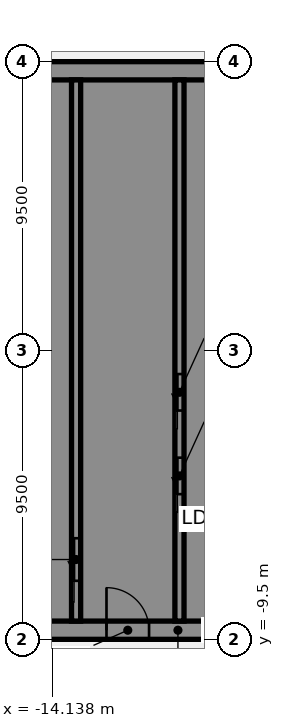
"""IFC4 building model, lengths in metres.
Left out: names, types, materials, properties, quantities, classifications, styles, units other than length and angle.
Written with IfcOpenShell. Run it as: python <this file> out.ifc"""

import sys

from ifc_helpers import new_model, si_unit, direction, frame, frame_2d, origin, place, context, subcontext, project, spatial, polyline, rectangle, outline, extrude, element, fill, save


model = new_model("IFC4")
c1 = context("Model", 3, precision=1e-05, world=origin(), true_north=direction((0.0, 1.0)))
c2 = subcontext(c1, "Body", "Model", "MODEL_VIEW")
j1 = project(units=[si_unit("LENGTHUNIT", "METRE"), si_unit("PLANEANGLEUNIT", "RADIAN")], contexts=[c1])
p1 = place(None, origin())
s1 = spatial("IfcSite", under=j1, at=p1, CompositionType="ELEMENT")
p2 = place(p1, origin())
s2 = spatial("IfcBuilding", under=s1, at=p2, CompositionType="ELEMENT")
p3 = place(p2, frame((0.0, 0.0, 133.0)))
s3 = spatial("IfcBuildingStorey", under=s2, at=p3, CompositionType="ELEMENT", Elevation=133.0)
p4 = place(p3, frame((-16.5, -9.2, 0.0), z_axis=(0.0, 0.0, 1.0), x_axis=(1.0, 0.0, 0.0)))
e1 = element("IfcWall", 1, at=p4, inside=s3, PredefinedType="SHEAR", context=c2, shape_type="SweptSolid", body=[
    extrude(rectangle(XDim=13.0, YDim=0.6, at=frame_2d((6.5, 0.0))), origin(), (0.0, 0.0, 1.0), 3.61),
])
p5 = place(p4, frame((4.15, 0.0, 0.0)))
e2 = element("IfcOpeningElement", 2, at=p5, cuts=e1, PredefinedType="OPENING", context=c2, shape_type="SweptSolid", body=[
    extrude(rectangle(XDim=1.4, YDim=2.1, at=frame_2d((0.7, 1.05))), frame((0.0, 0.31, 0.0), z_axis=(0.0, -1.0, 0.0), x_axis=(1.0, 0.0, 0.0)), (0.0, 0.0, 1.0), 0.62),
])
p6 = place(p4, frame((10.125, 0.0, 0.0)))
e3 = element("IfcOpeningElement", 3, at=p6, cuts=e1, PredefinedType="OPENING", context=c2, shape_type="SweptSolid", body=[
    extrude(rectangle(XDim=1.4, YDim=2.1, at=frame_2d((0.7, 1.05))), frame((0.0, 0.31, 0.0), z_axis=(0.0, -1.0, 0.0), x_axis=(1.0, 0.0, 0.0)), (0.0, 0.0, 1.0), 0.62),
])
p7 = place(p3, origin())
e4 = element("IfcWall", 4, at=p7, inside=s3, PredefinedType="SHEAR", context=c2, shape_type="SweptSolid", body=[
    extrude(outline(polyline([(-13.5, -8.9), (-13.5, -8.125), (-15.9, -8.125), (-15.9, -5.625), (-13.5, -5.625), (-13.5, -5.375), (-15.9, -5.375), (-15.9, -2.875), (-13.5, -2.875), (-13.5, -2.625), (-15.9, -2.625), (-15.9, -0.125), (-13.5, -0.125), (-13.5, 0.125), (-15.9, 0.125), (-15.9, 2.625), (-13.5, 2.625), (-13.5, 2.875), (-15.9, 2.875), (-15.9, 5.375), (-13.5, 5.375), (-13.5, 5.625), (-15.9, 5.625), (-15.9, 8.125), (-13.5, 8.125), (-13.5, 8.9), (-15.9, 8.9), (-16.5, 8.9), (-16.5, -8.9), (-15.9, -8.9), (-13.5, -8.9)])), origin(), (0.0, 0.0, 1.0), 3.61),
])
p8 = place(p3, frame((-16.5, 9.2, 0.0), z_axis=(0.0, 0.0, 1.0), x_axis=(1.0, 0.0, 0.0)))
e5 = element("IfcWall", 5, at=p8, inside=s3, PredefinedType="SHEAR", context=c2, shape_type="SweptSolid", body=[
    extrude(rectangle(XDim=13.0, YDim=0.6, at=frame_2d((6.5, 0.0))), origin(), (0.0, 0.0, 1.0), 3.61),
])
p9 = place(p3, origin())
e6 = element("IfcWall", 6, at=p9, inside=s3, PredefinedType="SHEAR", context=c2, shape_type="SweptSolid", body=[
    extrude(outline(polyline([(-9.8, -5.375), (-9.8, -5.625), (-7.5, -5.625), (-7.2, -5.625), (-7.2, 8.9), (-7.5, 8.9), (-9.8, 8.9), (-9.8, 8.125), (-7.5, 8.125), (-7.5, 5.625), (-9.8, 5.625), (-9.8, 5.375), (-7.5, 5.375), (-7.5, 2.875), (-9.8, 2.875), (-9.8, 2.625), (-7.5, 2.625), (-7.5, 0.125), (-9.8, 0.125), (-9.8, -0.125), (-7.5, -0.125), (-7.5, -2.625), (-9.8, -2.625), (-9.8, -2.875), (-7.5, -2.875), (-7.5, -5.375), (-9.8, -5.375)])), origin(), (0.0, 0.0, 1.0), 3.61),
])
p10 = place(p3, origin())
e7 = element("IfcWall", 7, at=p10, inside=s3, PredefinedType="SHEAR", context=c2, shape_type="SweptSolid", body=[
    extrude(outline(polyline([(-7.5, -8.125), (-9.55, -8.125), (-9.55, -5.625), (-9.8, -5.625), (-9.8, -8.125), (-9.8, -8.9), (-7.5, -8.9), (-7.5, -8.125)])), origin(), (0.0, 0.0, 1.0), 3.61),
])
p11 = place(p3, frame((-13.35, -8.9, 0.0), z_axis=(0.0, 0.0, 1.0), x_axis=(0.0, 1.0, 0.0)))
e8 = element("IfcWall", 8, at=p11, inside=s3, PredefinedType="SHEAR", context=c2, shape_type="SweptSolid", body=[
    extrude(rectangle(XDim=17.8, YDim=0.3, at=frame_2d((8.9, 0.0))), origin(), (0.0, 0.0, 1.0), 3.61),
])
p12 = place(p11, frame((1.325, 0.0, 0.0)))
e9 = element("IfcOpeningElement", 9, at=p12, cuts=e8, PredefinedType="OPENING", context=c2, shape_type="SweptSolid", body=[
    extrude(rectangle(XDim=1.4, YDim=2.1, at=frame_2d((0.7, 1.05))), frame((0.0, 0.16, 0.0), z_axis=(0.0, -1.0, 0.0), x_axis=(1.0, 0.0, 0.0)), (0.0, 0.0, 1.0), 0.32),
])
p13 = place(p3, frame((-9.95, -8.9, 0.0), z_axis=(0.0, 0.0, 1.0), x_axis=(0.0, 1.0, 0.0)))
e10 = element("IfcWall", 10, at=p13, inside=s3, PredefinedType="SHEAR", context=c2, shape_type="SweptSolid", body=[
    extrude(rectangle(XDim=17.8, YDim=0.3, at=frame_2d((8.9, 0.0))), origin(), (0.0, 0.0, 1.0), 3.61),
])
p14 = place(p13, frame((4.175, 0.0, 0.0)))
e11 = element("IfcOpeningElement", 11, at=p14, cuts=e10, PredefinedType="OPENING", context=c2, shape_type="SweptSolid", body=[
    extrude(rectangle(XDim=1.2, YDim=2.1, at=frame_2d((0.6, 1.05))), frame((0.0, 0.16, 0.0), z_axis=(0.0, -1.0, 0.0), x_axis=(1.0, 0.0, 0.0)), (0.0, 0.0, 1.0), 0.32),
])
p15 = place(p13, frame((6.925, 0.0, 0.0)))
e12 = element("IfcOpeningElement", 12, at=p15, cuts=e10, PredefinedType="OPENING", context=c2, shape_type="SweptSolid", body=[
    extrude(rectangle(XDim=1.2, YDim=2.1, at=frame_2d((0.6, 1.05))), frame((0.0, 0.16, 0.0), z_axis=(0.0, -1.0, 0.0), x_axis=(1.0, 0.0, 0.0)), (0.0, 0.0, 1.0), 0.32),
])
p16 = place(p5, origin())
e13 = element("IfcDoor", 13, at=p16, inside=s3, OperationType="SINGLE_SWING_LEFT", PredefinedType="DOOR", context=c2, shape_type="SweptSolid", body=[
    extrude(rectangle(XDim=1.4, YDim=2.1, at=frame_2d((0.7, 1.05))), frame((0.0, 0.025, 0.0), z_axis=(0.0, -1.0, 0.0), x_axis=(1.0, 0.0, 0.0)), (0.0, 0.0, 1.0), 0.05),
])
fill(e2, e13)
p17 = place(p12, origin())
e14 = element("IfcDoor", 14, at=p17, inside=s3, OperationType="SLIDING_TO_LEFT", PredefinedType="DOOR", context=c2, shape_type="SweptSolid", body=[
    extrude(rectangle(XDim=1.4, YDim=2.1, at=frame_2d((0.7, 1.05))), frame((0.0, 0.025, 0.0), z_axis=(0.0, -1.0, 0.0), x_axis=(1.0, 0.0, 0.0)), (0.0, 0.0, 1.0), 0.05),
])
fill(e9, e14)
p18 = place(p14, origin())
e15 = element("IfcDoor", 15, at=p18, inside=s3, OperationType="SLIDING_TO_LEFT", PredefinedType="DOOR", context=c2, shape_type="SweptSolid", body=[
    extrude(rectangle(XDim=1.2, YDim=2.1, at=frame_2d((0.6, 1.05))), frame((0.0, 0.025, 0.0), z_axis=(0.0, -1.0, 0.0), x_axis=(1.0, 0.0, 0.0)), (0.0, 0.0, 1.0), 0.05),
])
fill(e11, e15)
p19 = place(p15, origin())
e16 = element("IfcDoor", 16, at=p19, inside=s3, OperationType="SLIDING_TO_LEFT", PredefinedType="DOOR", context=c2, shape_type="SweptSolid", body=[
    extrude(rectangle(XDim=1.2, YDim=2.1, at=frame_2d((0.6, 1.05))), frame((0.0, 0.025, 0.0), z_axis=(0.0, -1.0, 0.0), x_axis=(1.0, 0.0, 0.0)), (0.0, 0.0, 1.0), 0.05),
])
fill(e12, e16)
save(model, sys.argv[1])
